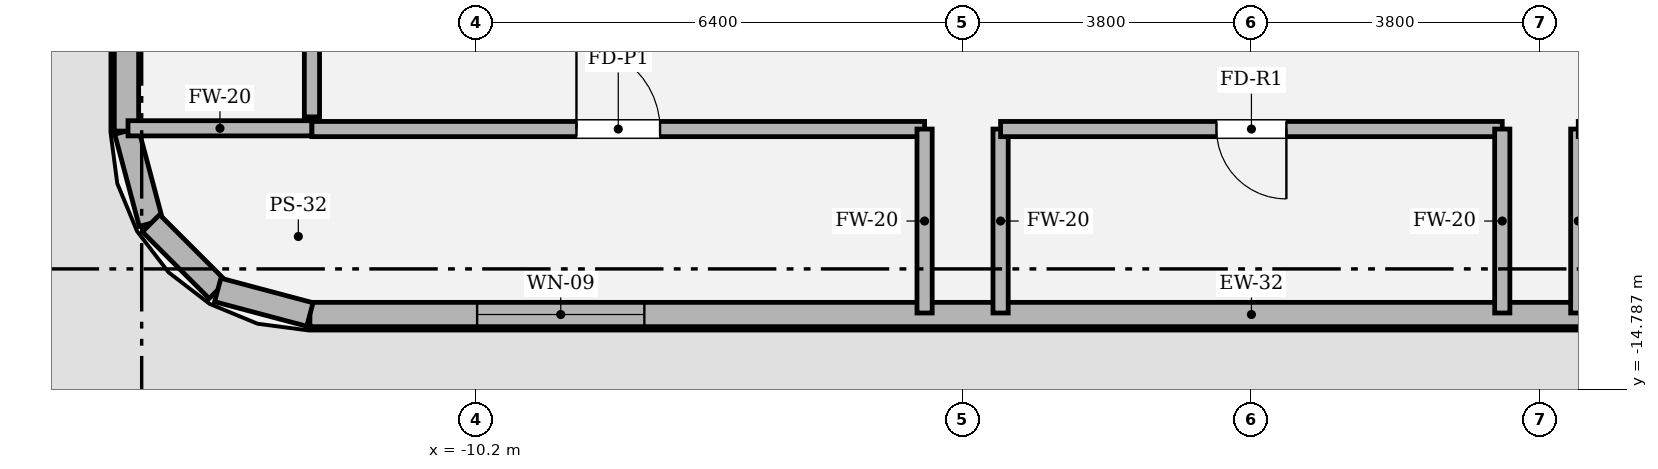
"""IFC4 building model, lengths in metres.
Left out: names, types, materials, properties, quantities, classifications, styles, units other than length and angle.
Written with IfcOpenShell. Run it as: python <this file> out.ifc"""

import sys

from ifc_helpers import new_model, si_unit, direction, frame, frame_2d, origin, place, context, subcontext, project, spatial, rectangle, extrude, element, fill, save


model = new_model("IFC4")
c1 = context("Model", 3, precision=1e-05, world=origin(), true_north=direction((0.0, 1.0)))
c2 = subcontext(c1, "Body", "Model", "MODEL_VIEW")
j1 = project(units=[si_unit("LENGTHUNIT", "METRE"), si_unit("PLANEANGLEUNIT", "RADIAN")], contexts=[c1])
p1 = place(None, origin())
s1 = spatial("IfcSite", under=j1, at=p1, CompositionType="ELEMENT")
p2 = place(p1, origin())
s2 = spatial("IfcBuilding", under=s1, at=p2, CompositionType="ELEMENT")
p3 = place(p2, frame((0.0, 0.0, 237.0)))
s3 = spatial("IfcBuildingStorey", under=s2, at=p3, CompositionType="ELEMENT", Elevation=237.0)
p4 = place(p3, frame((-12.387, -13.8, 0.0), z_axis=(0.0, 0.0, 1.0), x_axis=(1.0, 0.0, 0.0)))
e1 = element("IfcWall", 1, at=p4, inside=s3, PredefinedType="SOLIDWALL", context=c2, shape_type="SweptSolid", body=[
    extrude(rectangle(XDim=24.774, YDim=0.32, at=frame_2d((12.387, 0.0))), origin(), (0.0, 0.0, 1.0), 3.194),
])
p5 = place(p4, frame((2.2, 0.0, 0.9)))
e2 = element("IfcOpeningElement", 2, at=p5, cuts=e1, PredefinedType="OPENING", context=c2, shape_type="SweptSolid", body=[
    extrude(rectangle(XDim=2.2, YDim=1.2, at=frame_2d((1.1, 0.6))), frame((0.0, 0.17, 0.0), z_axis=(0.0, -1.0, 0.0), x_axis=(1.0, 0.0, 0.0)), (0.0, 0.0, 1.0), 0.34),
])
p6 = place(p4, frame((20.374, 0.0, 0.9)))
e3 = element("IfcOpeningElement", 3, at=p6, cuts=e1, PredefinedType="OPENING", context=c2, shape_type="SweptSolid", body=[
    extrude(rectangle(XDim=2.2, YDim=1.2, at=frame_2d((1.1, 0.6))), frame((0.0, 0.17, 0.0), z_axis=(0.0, -1.0, 0.0), x_axis=(1.0, 0.0, 0.0)), (0.0, 0.0, 1.0), 0.34),
])
p7 = place(p3, frame((-14.8, 11.387, 0.0), z_axis=(0.0, 0.0, 1.0), x_axis=(0.0, -1.0, 0.0)))
e4 = element("IfcWall", 4, at=p7, inside=s3, PredefinedType="SOLIDWALL", context=c2, shape_type="SweptSolid", body=[
    extrude(rectangle(XDim=22.774, YDim=0.32, at=frame_2d((11.387, 0.0))), origin(), (0.0, 0.0, 1.0), 3.194),
])
p8 = place(p7, frame((2.2, 0.0, 0.9)))
e5 = element("IfcOpeningElement", 5, at=p8, cuts=e4, PredefinedType="OPENING", context=c2, shape_type="SweptSolid", body=[
    extrude(rectangle(XDim=2.2, YDim=1.2, at=frame_2d((1.1, 0.6))), frame((0.0, 0.17, 0.0), z_axis=(0.0, -1.0, 0.0), x_axis=(1.0, 0.0, 0.0)), (0.0, 0.0, 1.0), 0.34),
])
p9 = place(p7, frame((18.374, 0.0, 0.9)))
e6 = element("IfcOpeningElement", 6, at=p9, cuts=e4, PredefinedType="OPENING", context=c2, shape_type="SweptSolid", body=[
    extrude(rectangle(XDim=2.2, YDim=1.2, at=frame_2d((1.1, 0.6))), frame((0.0, 0.17, 0.0), z_axis=(0.0, -1.0, 0.0), x_axis=(1.0, 0.0, 0.0)), (0.0, 0.0, 1.0), 0.34),
])
p10 = place(p3, frame((-14.8, -11.387, 0.0), z_axis=(0.0, 0.0, 1.0), x_axis=(0.25748094776, -0.966283375382, 0.0)))
e7 = element("IfcWall", 7, at=p10, inside=s3, PredefinedType="SOLIDWALL", context=c2, shape_type="SweptSolid", body=[
    extrude(rectangle(XDim=1.254, YDim=0.32, at=frame_2d((0.627, 0.0))), origin(), (0.0, 0.0, 1.0), 3.194),
])
p11 = place(p3, frame((-14.477, -12.599, 0.0), z_axis=(0.0, 0.0, 1.0), x_axis=(0.707106781187, -0.707106781187, 0.0)))
e8 = element("IfcWall", 8, at=p11, inside=s3, PredefinedType="SOLIDWALL", context=c2, shape_type="SweptSolid", body=[
    extrude(rectangle(XDim=1.242, YDim=0.32, at=frame_2d((0.621, 0.0))), origin(), (0.0, 0.0, 1.0), 3.194),
])
p12 = place(p3, frame((-13.599, -13.477, 0.0), z_axis=(0.0, 0.0, 1.0), x_axis=(0.966283375382, -0.25748094776, 0.0)))
e9 = element("IfcWall", 9, at=p12, inside=s3, PredefinedType="SOLIDWALL", context=c2, shape_type="SweptSolid", body=[
    extrude(rectangle(XDim=1.254, YDim=0.32, at=frame_2d((0.627, 0.0))), origin(), (0.0, 0.0, 1.0), 3.194),
])
p13 = place(p3, frame((-14.78, -11.35, 0.0), z_axis=(0.0, 0.0, 1.0), x_axis=(1.0, 0.0, 0.0)))
e10 = element("IfcWall", 10, at=p13, inside=s3, PredefinedType="SOLIDWALL", context=c2, shape_type="SweptSolid", body=[
    extrude(rectangle(XDim=2.42, YDim=0.2, at=frame_2d((1.21, 0.0))), origin(), (0.0, 0.0, 1.0), 3.194),
])
p14 = place(p3, frame((-12.36, -11.36, 0.0), z_axis=(0.0, 0.0, 1.0), x_axis=(1.0, 0.0, 0.0)))
e11 = element("IfcWall", 11, at=p14, inside=s3, PredefinedType="SOLIDWALL", context=c2, shape_type="SweptSolid", body=[
    extrude(rectangle(XDim=8.06, YDim=0.2, at=frame_2d((4.03, 0.0))), origin(), (0.0, 0.0, 1.0), 4.48),
])
p15 = place(p14, frame((3.48, 0.0, 0.0)))
e12 = element("IfcOpeningElement", 12, at=p15, cuts=e11, PredefinedType="OPENING", context=c2, shape_type="SweptSolid", body=[
    extrude(rectangle(XDim=1.1, YDim=2.2, at=frame_2d((0.55, 1.1))), frame((0.0, 0.11, 0.0), z_axis=(0.0, -1.0, 0.0), x_axis=(1.0, 0.0, 0.0)), (0.0, 0.0, 1.0), 0.22),
])
for number, where, z_axis, x_axis in (
    (13, (-4.3, -11.36, 0.0), (0.0, 0.0, 1.0), (0.0, -1.0, 0.0)),
    (14, (-3.3, -13.78, 0.0), (0.0, 0.0, 1.0), (0.0, 1.0, 0.0)),
):
    element("IfcWall", number, at=place(p3, frame(where, z_axis=z_axis, x_axis=x_axis)), inside=s3, PredefinedType="SOLIDWALL", context=c2, shape_type="SweptSolid", body=[
        extrude(rectangle(XDim=2.42, YDim=0.2, at=frame_2d((1.21, 0.0))), origin(), (0.0, 0.0, 1.0), 3.194),
    ])
p16 = place(p3, frame((-3.3, -11.36, 0.0), z_axis=(0.0, 0.0, 1.0), x_axis=(1.0, 0.0, 0.0)))
e15 = element("IfcWall", 15, at=p16, inside=s3, PredefinedType="SOLIDWALL", context=c2, shape_type="SweptSolid", body=[
    extrude(rectangle(XDim=6.6, YDim=0.2, at=frame_2d((3.3, 0.0))), origin(), (0.0, 0.0, 1.0), 4.48),
])
p17 = place(p16, frame((2.84, 0.0, 0.0)))
e16 = element("IfcOpeningElement", 16, at=p17, cuts=e15, PredefinedType="OPENING", context=c2, shape_type="SweptSolid", body=[
    extrude(rectangle(XDim=0.92, YDim=2.1, at=frame_2d((0.46, 1.05))), frame((0.0, 0.11, 0.0), z_axis=(0.0, -1.0, 0.0), x_axis=(1.0, 0.0, 0.0)), (0.0, 0.0, 1.0), 0.22),
])
for number, where, z_axis, x_axis in (
    (17, (3.3, -11.36, 0.0), (0.0, 0.0, 1.0), (0.0, -1.0, 0.0)),
    (18, (4.3, -13.78, 0.0), (0.0, 0.0, 1.0), (0.0, 1.0, 0.0)),
):
    element("IfcWall", number, at=place(p3, frame(where, z_axis=z_axis, x_axis=x_axis)), inside=s3, PredefinedType="SOLIDWALL", context=c2, shape_type="SweptSolid", body=[
        extrude(rectangle(XDim=2.42, YDim=0.2, at=frame_2d((1.21, 0.0))), origin(), (0.0, 0.0, 1.0), 3.194),
    ])
p18 = place(p3, frame((-12.36, -3.9, 0.0), z_axis=(0.0, 0.0, 1.0), x_axis=(0.0, -1.0, 0.0)))
e19 = element("IfcWall", 19, at=p18, inside=s3, PredefinedType="SOLIDWALL", context=c2, shape_type="SweptSolid", body=[
    extrude(rectangle(XDim=7.3, YDim=0.2, at=frame_2d((3.65, 0.0))), origin(), (0.0, 0.0, 1.0), 4.48),
])
p19 = place(p18, frame((3.1, 0.0, 0.0)))
e20 = element("IfcOpeningElement", 20, at=p19, cuts=e19, PredefinedType="OPENING", context=c2, shape_type="SweptSolid", body=[
    extrude(rectangle(XDim=1.1, YDim=2.2, at=frame_2d((0.55, 1.1))), frame((0.0, 0.11, 0.0), z_axis=(0.0, -1.0, 0.0), x_axis=(1.0, 0.0, 0.0)), (0.0, 0.0, 1.0), 0.22),
])
p20 = place(p5, origin())
e21 = element("IfcWindow", 21, at=p20, inside=s3, PartitioningType="SINGLE_PANEL", PredefinedType="WINDOW", context=c2, shape_type="SweptSolid", body=[
    extrude(rectangle(XDim=2.2, YDim=1.2, at=frame_2d((1.1, 0.6))), frame((0.0, 0.03, 0.0), z_axis=(0.0, -1.0, 0.0), x_axis=(1.0, 0.0, 0.0)), (0.0, 0.0, 1.0), 0.06),
])
fill(e2, e21)
p21 = place(p15, origin())
e22 = element("IfcDoor", 22, at=p21, inside=s3, OperationType="SINGLE_SWING_LEFT", PredefinedType="DOOR", context=c2, shape_type="SweptSolid", body=[
    extrude(rectangle(XDim=1.1, YDim=2.2, at=frame_2d((0.55, 1.1))), frame((0.0, 0.025, 0.0), z_axis=(0.0, -1.0, 0.0), x_axis=(1.0, 0.0, 0.0)), (0.0, 0.0, 1.0), 0.05),
])
fill(e12, e22)
p22 = place(p17, origin())
e23 = element("IfcDoor", 23, at=p22, inside=s3, OperationType="SINGLE_SWING_RIGHT", PredefinedType="DOOR", context=c2, shape_type="SweptSolid", body=[
    extrude(rectangle(XDim=0.92, YDim=2.1, at=frame_2d((0.46, 1.05))), frame((0.0, 0.025, 0.0), z_axis=(0.0, -1.0, 0.0), x_axis=(1.0, 0.0, 0.0)), (0.0, 0.0, 1.0), 0.05),
])
fill(e16, e23)
save(model, sys.argv[1])
